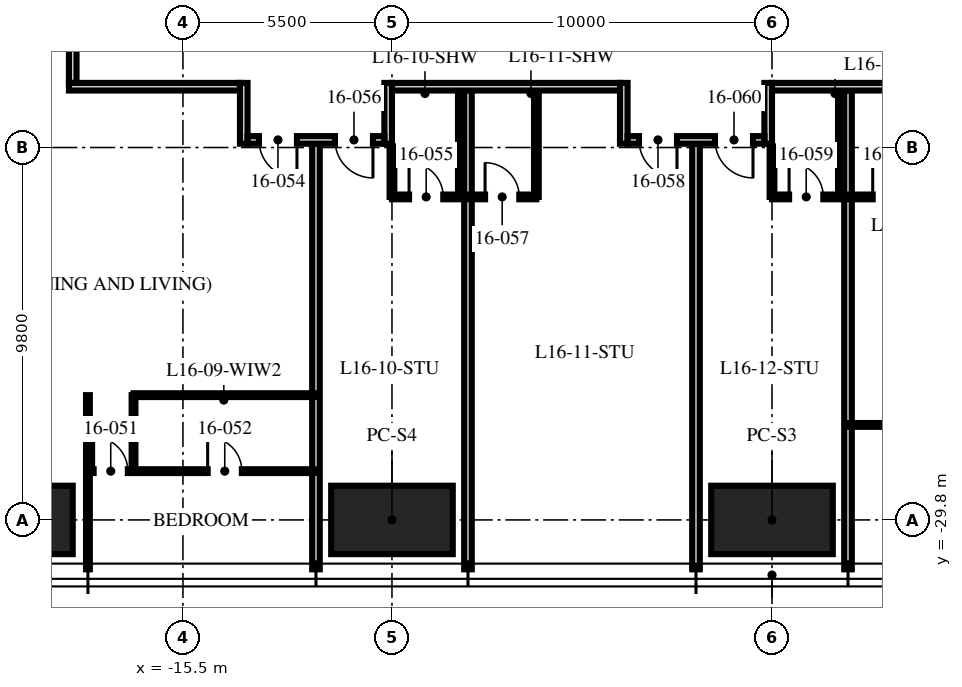
"""IFC4 building model, lengths in metres.
Left out: names, types, materials, properties, quantities, classifications, styles, units other than length and angle.
Written with IfcOpenShell. Run it as: python <this file> out.ifc"""

import sys

from ifc_helpers import new_model, si_unit, direction, frame, frame_2d, origin, origin_2d, place, context, subcontext, project, spatial, rectangle, hollow_rectangle, extrude, element, fill, save


model = new_model("IFC4")
c1 = context("Model", 3, precision=1e-05, world=origin(), true_north=direction((0.0, 1.0)))
c2 = subcontext(c1, "Body", "Model", "MODEL_VIEW")
j1 = project(units=[si_unit("LENGTHUNIT", "METRE"), si_unit("PLANEANGLEUNIT", "RADIAN")], contexts=[c1])
p1 = place(None, origin())
s1 = spatial("IfcSite", under=j1, at=p1, CompositionType="ELEMENT")
p2 = place(p1, origin())
s2 = spatial("IfcBuilding", under=s1, at=p2, CompositionType="ELEMENT")
p3 = place(p2, frame((0.0, 0.0, 66.0)))
s3 = spatial("IfcBuildingStorey", under=s2, at=p3, CompositionType="ELEMENT", Elevation=66.0)
for number, where, z_axis, x_axis in (
    (1, (0.0, -29.8, 0.0), (0.0, 0.0, 1.0), (1.0, 0.0, 0.0)),
    (2, (-10.0, -29.8, 0.0), (0.0, 0.0, 1.0), (1.0, 0.0, 0.0)),
    (3, (-20.0, -29.8, 0.0), (0.0, 0.0, 1.0), (1.0, 0.0, 0.0)),
):
    element("IfcColumn", number, at=place(p3, frame(where, z_axis=z_axis, x_axis=x_axis)), inside=s3, PredefinedType="COLUMN", context=c2, shape_type="SweptSolid", body=[
        extrude(hollow_rectangle(XDim=3.2, YDim=1.8, WallThickness=0.2, at=origin_2d()), origin(), (0.0, 0.0, 1.0), 3.75),
    ])
p4 = place(p3, frame((-18.0, -26.517, 0.0), z_axis=(0.0, 0.0, 1.0), x_axis=(0.0, -1.0, 0.0)))
e4 = element("IfcWall", 4, at=p4, inside=s3, PredefinedType="PARTITIONING", context=c2, shape_type="SweptSolid", body=[
    extrude(rectangle(XDim=4.583, YDim=0.1, at=frame_2d((2.292, 0.0))), origin(), (0.0, 0.0, 1.0), 2.71),
])
p5 = place(p3, frame((-12.0, -19.9, 0.0), z_axis=(0.0, 0.0, 1.0), x_axis=(0.0, -1.0, 0.0)))
e5 = element("IfcWall", 5, at=p5, inside=s3, PredefinedType="PARTITIONING", context=c2, shape_type="SweptSolid", body=[
    extrude(rectangle(XDim=11.2, YDim=0.2, at=frame_2d((5.6, 0.0))), origin(), (0.0, 0.0, 1.0), 2.71),
])
p6 = place(p3, frame((-8.0, -18.5, 0.0), z_axis=(0.0, 0.0, 1.0), x_axis=(0.0, -1.0, 0.0)))
e6 = element("IfcWall", 6, at=p6, inside=s3, PredefinedType="PARTITIONING", context=c2, shape_type="SweptSolid", body=[
    extrude(rectangle(XDim=12.6, YDim=0.2, at=frame_2d((6.3, 0.0))), origin(), (0.0, 0.0, 1.0), 2.71),
])
p7 = place(p3, frame((-2.0, -19.9, 0.0), z_axis=(0.0, 0.0, 1.0), x_axis=(0.0, -1.0, 0.0)))
e7 = element("IfcWall", 7, at=p7, inside=s3, PredefinedType="PARTITIONING", context=c2, shape_type="SweptSolid", body=[
    extrude(rectangle(XDim=11.2, YDim=0.2, at=frame_2d((5.6, 0.0))), origin(), (0.0, 0.0, 1.0), 2.71),
])
p8 = place(p3, frame((2.0, -18.5, 0.0), z_axis=(0.0, 0.0, 1.0), x_axis=(0.0, -1.0, 0.0)))
e8 = element("IfcWall", 8, at=p8, inside=s3, PredefinedType="PARTITIONING", context=c2, shape_type="SweptSolid", body=[
    extrude(rectangle(XDim=12.6, YDim=0.2, at=frame_2d((6.3, 0.0))), origin(), (0.0, 0.0, 1.0), 2.71),
])
p9 = place(p3, frame((-18.0, -28.517, 0.0), z_axis=(0.0, 0.0, 1.0), x_axis=(1.0, 0.0, 0.0)))
e9 = element("IfcWall", 9, at=p9, inside=s3, PredefinedType="PARTITIONING", context=c2, shape_type="SweptSolid", body=[
    extrude(rectangle(XDim=6.0, YDim=0.1, at=frame_2d((3.0, 0.0))), origin(), (0.0, 0.0, 1.0), 2.61),
])
p10 = place(p9, frame((0.15, 0.0, 0.0)))
e10 = element("IfcOpeningElement", 10, at=p10, cuts=e9, PredefinedType="OPENING", context=c2, shape_type="SweptSolid", body=[
    extrude(rectangle(XDim=0.9, YDim=2.1, at=frame_2d((0.45, 1.05))), frame((0.0, 0.06, 0.0), z_axis=(0.0, -1.0, 0.0), x_axis=(1.0, 0.0, 0.0)), (0.0, 0.0, 1.0), 0.12),
])
p11 = place(p9, frame((3.15, 0.0, 0.0)))
e11 = element("IfcOpeningElement", 11, at=p11, cuts=e9, PredefinedType="OPENING", context=c2, shape_type="SweptSolid", body=[
    extrude(rectangle(XDim=0.9, YDim=2.1, at=frame_2d((0.45, 1.05))), frame((0.0, 0.06, 0.0), z_axis=(0.0, -1.0, 0.0), x_axis=(1.0, 0.0, 0.0)), (0.0, 0.0, 1.0), 0.12),
])
p12 = place(p3, frame((-16.8, -26.517, 0.0), z_axis=(0.0, 0.0, 1.0), x_axis=(0.0, -1.0, 0.0)))
e12 = element("IfcWall", 12, at=p12, inside=s3, PredefinedType="PARTITIONING", context=c2, shape_type="SweptSolid", body=[
    extrude(rectangle(XDim=2.0, YDim=0.1, at=frame_2d((1.0, 0.0))), origin(), (0.0, 0.0, 1.0), 3.5),
])
p13 = place(p3, frame((-16.8, -26.517, 0.0), z_axis=(0.0, 0.0, 1.0), x_axis=(1.0, 0.0, 0.0)))
e13 = element("IfcWall", 13, at=p13, inside=s3, PredefinedType="PARTITIONING", context=c2, shape_type="SweptSolid", body=[
    extrude(rectangle(XDim=4.8, YDim=0.1, at=frame_2d((2.4, 0.0))), origin(), (0.0, 0.0, 1.0), 2.61),
])
p14 = place(p3, frame((-10.0, -21.3, 0.0), z_axis=(0.0, 0.0, 1.0), x_axis=(1.0, 0.0, 0.0)))
e14 = element("IfcWall", 14, at=p14, inside=s3, PredefinedType="PARTITIONING", context=c2, shape_type="SweptSolid", body=[
    extrude(rectangle(XDim=1.8, YDim=0.125, at=frame_2d((0.9, 0.0))), origin(), (0.0, 0.0, 1.0), 2.492),
])
p15 = place(p14, frame((0.45, 0.0, 0.0)))
e15 = element("IfcOpeningElement", 15, at=p15, cuts=e14, PredefinedType="OPENING", context=c2, shape_type="SweptSolid", body=[
    extrude(rectangle(XDim=0.9, YDim=2.1, at=frame_2d((0.45, 1.05))), frame((0.0, 0.073, 0.0), z_axis=(0.0, -1.0, 0.0), x_axis=(1.0, 0.0, 0.0)), (0.0, 0.0, 1.0), 0.145),
])
p16 = place(p3, frame((-10.0, -19.97, 0.0), z_axis=(0.0, 0.0, 1.0), x_axis=(0.0, -1.0, 0.0)))
e16 = element("IfcWall", 16, at=p16, inside=s3, PredefinedType="PARTITIONING", context=c2, shape_type="SweptSolid", body=[
    extrude(rectangle(XDim=1.33, YDim=0.125, at=frame_2d((0.665, 0.0))), origin(), (0.0, 0.0, 1.0), 2.492),
])
p17 = place(p3, frame((-8.2, -18.5, 0.0), z_axis=(0.0, 0.0, 1.0), x_axis=(0.0, -1.0, 0.0)))
e17 = element("IfcWall", 17, at=p17, inside=s3, PredefinedType="PARTITIONING", context=c2, shape_type="SweptSolid", body=[
    extrude(rectangle(XDim=2.8, YDim=0.125, at=frame_2d((1.4, 0.0))), origin(), (0.0, 0.0, 1.0), 3.5),
])
p18 = place(p3, frame((-8.0, -21.3, 0.0), z_axis=(0.0, 0.0, 1.0), x_axis=(1.0, 0.0, 0.0)))
e18 = element("IfcWall", 18, at=p18, inside=s3, PredefinedType="PARTITIONING", context=c2, shape_type="SweptSolid", body=[
    extrude(rectangle(XDim=1.8, YDim=0.125, at=frame_2d((0.9, 0.0))), origin(), (0.0, 0.0, 1.0), 3.5),
])
p19 = place(p18, frame((0.45, 0.0, 0.0)))
e19 = element("IfcOpeningElement", 19, at=p19, cuts=e18, PredefinedType="OPENING", context=c2, shape_type="SweptSolid", body=[
    extrude(rectangle(XDim=0.9, YDim=2.1, at=frame_2d((0.45, 1.05))), frame((0.0, 0.073, 0.0), z_axis=(0.0, -1.0, 0.0), x_axis=(1.0, 0.0, 0.0)), (0.0, 0.0, 1.0), 0.145),
])
p20 = place(p3, frame((-6.2, -18.5, 0.0), z_axis=(0.0, 0.0, 1.0), x_axis=(0.0, -1.0, 0.0)))
e20 = element("IfcWall", 20, at=p20, inside=s3, PredefinedType="PARTITIONING", context=c2, shape_type="SweptSolid", body=[
    extrude(rectangle(XDim=2.8, YDim=0.125, at=frame_2d((1.4, 0.0))), origin(), (0.0, 0.0, 1.0), 3.5),
])
p21 = place(p3, frame((0.0, -21.3, 0.0), z_axis=(0.0, 0.0, 1.0), x_axis=(1.0, 0.0, 0.0)))
e21 = element("IfcWall", 21, at=p21, inside=s3, PredefinedType="PARTITIONING", context=c2, shape_type="SweptSolid", body=[
    extrude(rectangle(XDim=1.8, YDim=0.125, at=frame_2d((0.9, 0.0))), origin(), (0.0, 0.0, 1.0), 2.492),
])
p22 = place(p21, frame((0.45, 0.0, 0.0)))
e22 = element("IfcOpeningElement", 22, at=p22, cuts=e21, PredefinedType="OPENING", context=c2, shape_type="SweptSolid", body=[
    extrude(rectangle(XDim=0.9, YDim=2.1, at=frame_2d((0.45, 1.05))), frame((0.0, 0.073, 0.0), z_axis=(0.0, -1.0, 0.0), x_axis=(1.0, 0.0, 0.0)), (0.0, 0.0, 1.0), 0.145),
])
p23 = place(p3, frame((0.0, -19.97, 0.0), z_axis=(0.0, 0.0, 1.0), x_axis=(0.0, -1.0, 0.0)))
e23 = element("IfcWall", 23, at=p23, inside=s3, PredefinedType="PARTITIONING", context=c2, shape_type="SweptSolid", body=[
    extrude(rectangle(XDim=1.33, YDim=0.125, at=frame_2d((0.665, 0.0))), origin(), (0.0, 0.0, 1.0), 2.492),
])
p24 = place(p3, frame((1.8, -18.5, 0.0), z_axis=(0.0, 0.0, 1.0), x_axis=(0.0, -1.0, 0.0)))
e24 = element("IfcWall", 24, at=p24, inside=s3, PredefinedType="PARTITIONING", context=c2, shape_type="SweptSolid", body=[
    extrude(rectangle(XDim=2.8, YDim=0.125, at=frame_2d((1.4, 0.0))), origin(), (0.0, 0.0, 1.0), 3.5),
])
p25 = place(p3, frame((2.0, -27.3, 0.0), z_axis=(0.0, 0.0, 1.0), x_axis=(1.0, 0.0, 0.0)))
e25 = element("IfcWall", 25, at=p25, inside=s3, PredefinedType="PARTITIONING", context=c2, shape_type="SweptSolid", body=[
    extrude(rectangle(XDim=6.0, YDim=0.1, at=frame_2d((3.0, 0.0))), origin(), (0.0, 0.0, 1.0), 2.61),
])
p26 = place(p25, frame((2.55, 0.0, 0.0)))
e26 = element("IfcOpeningElement", 26, at=p26, cuts=e25, PredefinedType="OPENING", context=c2, shape_type="SweptSolid", body=[
    extrude(rectangle(XDim=0.9, YDim=2.1, at=frame_2d((0.45, 1.05))), frame((0.0, 0.06, 0.0), z_axis=(0.0, -1.0, 0.0), x_axis=(1.0, 0.0, 0.0)), (0.0, 0.0, 1.0), 0.12),
])
p27 = place(p3, frame((2.0, -21.3, 0.0), z_axis=(0.0, 0.0, 1.0), x_axis=(1.0, 0.0, 0.0)))
e27 = element("IfcWall", 27, at=p27, inside=s3, PredefinedType="PARTITIONING", context=c2, shape_type="SweptSolid", body=[
    extrude(rectangle(XDim=5.9, YDim=0.125, at=frame_2d((2.95, 0.0))), origin(), (0.0, 0.0, 1.0), 2.61),
])
p28 = place(p27, frame((0.65, 0.0, 0.0)))
e28 = element("IfcOpeningElement", 28, at=p28, cuts=e27, PredefinedType="OPENING", context=c2, shape_type="SweptSolid", body=[
    extrude(rectangle(XDim=0.9, YDim=2.1, at=frame_2d((0.45, 1.05))), frame((0.0, 0.073, 0.0), z_axis=(0.0, -1.0, 0.0), x_axis=(1.0, 0.0, 0.0)), (0.0, 0.0, 1.0), 0.145),
])
p29 = place(p27, frame((2.85, 0.0, 0.0)))
e29 = element("IfcOpeningElement", 29, at=p29, cuts=e27, PredefinedType="OPENING", context=c2, shape_type="SweptSolid", body=[
    extrude(rectangle(XDim=0.9, YDim=2.1, at=frame_2d((0.45, 1.05))), frame((0.0, 0.073, 0.0), z_axis=(0.0, -1.0, 0.0), x_axis=(1.0, 0.0, 0.0)), (0.0, 0.0, 1.0), 0.145),
])
p30 = place(p27, frame((4.7, 0.0, 0.0)))
e30 = element("IfcOpeningElement", 30, at=p30, cuts=e27, PredefinedType="OPENING", context=c2, shape_type="SweptSolid", body=[
    extrude(rectangle(XDim=0.9, YDim=2.1, at=frame_2d((0.45, 1.05))), frame((0.0, 0.073, 0.0), z_axis=(0.0, -1.0, 0.0), x_axis=(1.0, 0.0, 0.0)), (0.0, 0.0, 1.0), 0.145),
])
p31 = place(p3, frame((-18.4, 18.3, 0.0), z_axis=(0.0, 0.0, 1.0), x_axis=(0.0, -1.0, 0.0)))
e31 = element("IfcWall", 31, at=p31, inside=s3, PredefinedType="PARTITIONING", context=c2, shape_type="SweptSolid", body=[
    extrude(rectangle(XDim=36.6, YDim=0.2, at=frame_2d((18.3, 0.0))), origin(), (0.0, 0.0, 1.0), 2.3),
])
p32 = place(p31, frame((8.57, 0.0, 0.0)))
e32 = element("IfcOpeningElement", 32, at=p32, cuts=e31, PredefinedType="OPENING", context=c2, shape_type="SweptSolid", body=[
    extrude(rectangle(XDim=1.0, YDim=2.2, at=frame_2d((0.5, 1.1))), frame((0.0, 0.11, 0.0), z_axis=(0.0, -1.0, 0.0), x_axis=(1.0, 0.0, 0.0)), (0.0, 0.0, 1.0), 0.22),
])
p33 = place(p31, frame((14.87, 0.0, 0.0)))
e33 = element("IfcOpeningElement", 33, at=p33, cuts=e31, PredefinedType="OPENING", context=c2, shape_type="SweptSolid", body=[
    extrude(rectangle(XDim=1.0, YDim=2.2, at=frame_2d((0.5, 1.1))), frame((0.0, 0.11, 0.0), z_axis=(0.0, -1.0, 0.0), x_axis=(1.0, 0.0, 0.0)), (0.0, 0.0, 1.0), 0.22),
])
p34 = place(p31, frame((18.87, 0.0, 0.0)))
e34 = element("IfcOpeningElement", 34, at=p34, cuts=e31, PredefinedType="OPENING", context=c2, shape_type="SweptSolid", body=[
    extrude(rectangle(XDim=1.0, YDim=2.2, at=frame_2d((0.5, 1.1))), frame((0.0, 0.11, 0.0), z_axis=(0.0, -1.0, 0.0), x_axis=(1.0, 0.0, 0.0)), (0.0, 0.0, 1.0), 0.22),
])
p35 = place(p3, frame((18.5, -18.4, 0.0), z_axis=(0.0, 0.0, 1.0), x_axis=(-1.0, 0.0, 0.0)))
e35 = element("IfcWall", 35, at=p35, inside=s3, PredefinedType="PARTITIONING", context=c2, shape_type="SweptSolid", body=[
    extrude(rectangle(XDim=18.5, YDim=0.2, at=frame_2d((9.25, 0.0))), origin(), (0.0, 0.0, 1.0), 2.3),
])
p36 = place(p3, frame((-0.1, -18.3, 0.0), z_axis=(0.0, 0.0, 1.0), x_axis=(0.0, -1.0, 0.0)))
e36 = element("IfcWall", 36, at=p36, inside=s3, PredefinedType="PARTITIONING", context=c2, shape_type="SweptSolid", body=[
    extrude(rectangle(XDim=1.6, YDim=0.2, at=frame_2d((0.8, 0.0))), origin(), (0.0, 0.0, 1.0), 2.492),
])
p37 = place(p3, frame((-3.9, -18.3, 0.0), z_axis=(0.0, 0.0, 1.0), x_axis=(0.0, -1.0, 0.0)))
e37 = element("IfcWall", 37, at=p37, inside=s3, PredefinedType="PARTITIONING", context=c2, shape_type="SweptSolid", body=[
    extrude(rectangle(XDim=1.6, YDim=0.2, at=frame_2d((0.8, 0.0))), origin(), (0.0, 0.0, 1.0), 3.5),
])
p38 = place(p3, frame((-0.2, -19.8, 0.0), z_axis=(0.0, 0.0, 1.0), x_axis=(-1.0, 0.0, 0.0)))
e38 = element("IfcWall", 38, at=p38, inside=s3, PredefinedType="PARTITIONING", context=c2, shape_type="SweptSolid", body=[
    extrude(rectangle(XDim=3.6, YDim=0.2, at=frame_2d((1.8, 0.0))), origin(), (0.0, 0.0, 1.0), 3.5),
])
p39 = place(p38, frame((2.3, 0.0, 0.0)))
e39 = element("IfcOpeningElement", 39, at=p39, cuts=e38, PredefinedType="OPENING", context=c2, shape_type="SweptSolid", body=[
    extrude(rectangle(XDim=1.0, YDim=2.2, at=frame_2d((0.5, 1.1))), frame((0.0, 0.11, 0.0), z_axis=(0.0, -1.0, 0.0), x_axis=(1.0, 0.0, 0.0)), (0.0, 0.0, 1.0), 0.22),
])
p40 = place(p38, frame((0.3, 0.0, 0.0)))
e40 = element("IfcOpeningElement", 40, at=p40, cuts=e38, PredefinedType="OPENING", context=c2, shape_type="SweptSolid", body=[
    extrude(rectangle(XDim=1.0, YDim=2.2, at=frame_2d((0.5, 1.1))), frame((0.0, 0.11, 0.0), z_axis=(0.0, -1.0, 0.0), x_axis=(1.0, 0.0, 0.0)), (0.0, 0.0, 1.0), 0.22),
])
p41 = place(p3, frame((-4.0, -18.4, 0.0), z_axis=(0.0, 0.0, 1.0), x_axis=(-1.0, 0.0, 0.0)))
e41 = element("IfcWall", 41, at=p41, inside=s3, PredefinedType="PARTITIONING", context=c2, shape_type="SweptSolid", body=[
    extrude(rectangle(XDim=6.0, YDim=0.2, at=frame_2d((3.0, 0.0))), origin(), (0.0, 0.0, 1.0), 2.492),
])
p42 = place(p3, frame((-10.1, -18.3, 0.0), z_axis=(0.0, 0.0, 1.0), x_axis=(0.0, -1.0, 0.0)))
e42 = element("IfcWall", 42, at=p42, inside=s3, PredefinedType="PARTITIONING", context=c2, shape_type="SweptSolid", body=[
    extrude(rectangle(XDim=1.6, YDim=0.2, at=frame_2d((0.8, 0.0))), origin(), (0.0, 0.0, 1.0), 2.492),
])
p43 = place(p3, frame((-13.9, -18.3, 0.0), z_axis=(0.0, 0.0, 1.0), x_axis=(0.0, -1.0, 0.0)))
e43 = element("IfcWall", 43, at=p43, inside=s3, PredefinedType="PARTITIONING", context=c2, shape_type="SweptSolid", body=[
    extrude(rectangle(XDim=1.6, YDim=0.2, at=frame_2d((0.8, 0.0))), origin(), (0.0, 0.0, 1.0), 3.5),
])
p44 = place(p3, frame((-10.2, -19.8, 0.0), z_axis=(0.0, 0.0, 1.0), x_axis=(-1.0, 0.0, 0.0)))
e44 = element("IfcWall", 44, at=p44, inside=s3, PredefinedType="PARTITIONING", context=c2, shape_type="SweptSolid", body=[
    extrude(rectangle(XDim=3.6, YDim=0.2, at=frame_2d((1.8, 0.0))), origin(), (0.0, 0.0, 1.0), 3.5),
])
p45 = place(p44, frame((2.3, 0.0, 0.0)))
e45 = element("IfcOpeningElement", 45, at=p45, cuts=e44, PredefinedType="OPENING", context=c2, shape_type="SweptSolid", body=[
    extrude(rectangle(XDim=1.0, YDim=2.2, at=frame_2d((0.5, 1.1))), frame((0.0, 0.11, 0.0), z_axis=(0.0, -1.0, 0.0), x_axis=(1.0, 0.0, 0.0)), (0.0, 0.0, 1.0), 0.22),
])
p46 = place(p44, frame((0.3, 0.0, 0.0)))
e46 = element("IfcOpeningElement", 46, at=p46, cuts=e44, PredefinedType="OPENING", context=c2, shape_type="SweptSolid", body=[
    extrude(rectangle(XDim=1.0, YDim=2.2, at=frame_2d((0.5, 1.1))), frame((0.0, 0.11, 0.0), z_axis=(0.0, -1.0, 0.0), x_axis=(1.0, 0.0, 0.0)), (0.0, 0.0, 1.0), 0.22),
])
p47 = place(p3, frame((-14.0, -18.4, 0.0), z_axis=(0.0, 0.0, 1.0), x_axis=(-1.0, 0.0, 0.0)))
e47 = element("IfcWall", 47, at=p47, inside=s3, PredefinedType="PARTITIONING", context=c2, shape_type="SweptSolid", body=[
    extrude(rectangle(XDim=4.5, YDim=0.2, at=frame_2d((2.25, 0.0))), origin(), (0.0, 0.0, 1.0), 2.3),
])
p48 = place(p10, origin())
e48 = element("IfcDoor", 48, at=p48, inside=s3, OperationType="SINGLE_SWING_LEFT", PredefinedType="DOOR", context=c2, shape_type="SweptSolid", body=[
    extrude(rectangle(XDim=0.9, YDim=2.1, at=frame_2d((0.45, 1.05))), frame((0.0, 0.025, 0.0), z_axis=(0.0, -1.0, 0.0), x_axis=(1.0, 0.0, 0.0)), (0.0, 0.0, 1.0), 0.05),
])
fill(e10, e48)
p49 = place(p11, origin())
e49 = element("IfcDoor", 49, at=p49, inside=s3, OperationType="SINGLE_SWING_LEFT", PredefinedType="DOOR", context=c2, shape_type="SweptSolid", body=[
    extrude(rectangle(XDim=0.9, YDim=2.1, at=frame_2d((0.45, 1.05))), frame((0.0, 0.025, 0.0), z_axis=(0.0, -1.0, 0.0), x_axis=(1.0, 0.0, 0.0)), (0.0, 0.0, 1.0), 0.05),
])
fill(e11, e49)
p50 = place(p45, origin())
e50 = element("IfcDoor", 50, at=p50, inside=s3, OperationType="SINGLE_SWING_LEFT", PredefinedType="DOOR", context=c2, shape_type="SweptSolid", body=[
    extrude(rectangle(XDim=1.0, YDim=2.2, at=frame_2d((0.5, 1.1))), frame((0.0, 0.025, 0.0), z_axis=(0.0, -1.0, 0.0), x_axis=(1.0, 0.0, 0.0)), (0.0, 0.0, 1.0), 0.05),
])
fill(e45, e50)
p51 = place(p15, origin())
e51 = element("IfcDoor", 51, at=p51, inside=s3, OperationType="SINGLE_SWING_LEFT", PredefinedType="DOOR", context=c2, shape_type="SweptSolid", body=[
    extrude(rectangle(XDim=0.9, YDim=2.1, at=frame_2d((0.45, 1.05))), frame((0.0, 0.025, 0.0), z_axis=(0.0, -1.0, 0.0), x_axis=(1.0, 0.0, 0.0)), (0.0, 0.0, 1.0), 0.05),
])
fill(e15, e51)
p52 = place(p46, origin())
e52 = element("IfcDoor", 52, at=p52, inside=s3, OperationType="SINGLE_SWING_LEFT", PredefinedType="DOOR", context=c2, shape_type="SweptSolid", body=[
    extrude(rectangle(XDim=1.0, YDim=2.2, at=frame_2d((0.5, 1.1))), frame((0.0, 0.025, 0.0), z_axis=(0.0, -1.0, 0.0), x_axis=(1.0, 0.0, 0.0)), (0.0, 0.0, 1.0), 0.05),
])
fill(e46, e52)
p53 = place(p19, origin())
e53 = element("IfcDoor", 53, at=p53, inside=s3, OperationType="SINGLE_SWING_LEFT", PredefinedType="DOOR", context=c2, shape_type="SweptSolid", body=[
    extrude(rectangle(XDim=0.9, YDim=2.1, at=frame_2d((0.45, 1.05))), frame((0.0, 0.025, 0.0), z_axis=(0.0, -1.0, 0.0), x_axis=(1.0, 0.0, 0.0)), (0.0, 0.0, 1.0), 0.05),
])
fill(e19, e53)
p54 = place(p39, origin())
e54 = element("IfcDoor", 54, at=p54, inside=s3, OperationType="SINGLE_SWING_LEFT", PredefinedType="DOOR", context=c2, shape_type="SweptSolid", body=[
    extrude(rectangle(XDim=1.0, YDim=2.2, at=frame_2d((0.5, 1.1))), frame((0.0, 0.025, 0.0), z_axis=(0.0, -1.0, 0.0), x_axis=(1.0, 0.0, 0.0)), (0.0, 0.0, 1.0), 0.05),
])
fill(e39, e54)
p55 = place(p22, origin())
e55 = element("IfcDoor", 55, at=p55, inside=s3, OperationType="SINGLE_SWING_LEFT", PredefinedType="DOOR", context=c2, shape_type="SweptSolid", body=[
    extrude(rectangle(XDim=0.9, YDim=2.1, at=frame_2d((0.45, 1.05))), frame((0.0, 0.025, 0.0), z_axis=(0.0, -1.0, 0.0), x_axis=(1.0, 0.0, 0.0)), (0.0, 0.0, 1.0), 0.05),
])
fill(e22, e55)
p56 = place(p40, origin())
e56 = element("IfcDoor", 56, at=p56, inside=s3, OperationType="SINGLE_SWING_LEFT", PredefinedType="DOOR", context=c2, shape_type="SweptSolid", body=[
    extrude(rectangle(XDim=1.0, YDim=2.2, at=frame_2d((0.5, 1.1))), frame((0.0, 0.025, 0.0), z_axis=(0.0, -1.0, 0.0), x_axis=(1.0, 0.0, 0.0)), (0.0, 0.0, 1.0), 0.05),
])
fill(e40, e56)
p57 = place(p28, origin())
e57 = element("IfcDoor", 57, at=p57, inside=s3, OperationType="SINGLE_SWING_LEFT", PredefinedType="DOOR", context=c2, shape_type="SweptSolid", body=[
    extrude(rectangle(XDim=0.9, YDim=2.1, at=frame_2d((0.45, 1.05))), frame((0.0, 0.025, 0.0), z_axis=(0.0, -1.0, 0.0), x_axis=(1.0, 0.0, 0.0)), (0.0, 0.0, 1.0), 0.05),
])
fill(e28, e57)
save(model, sys.argv[1])
